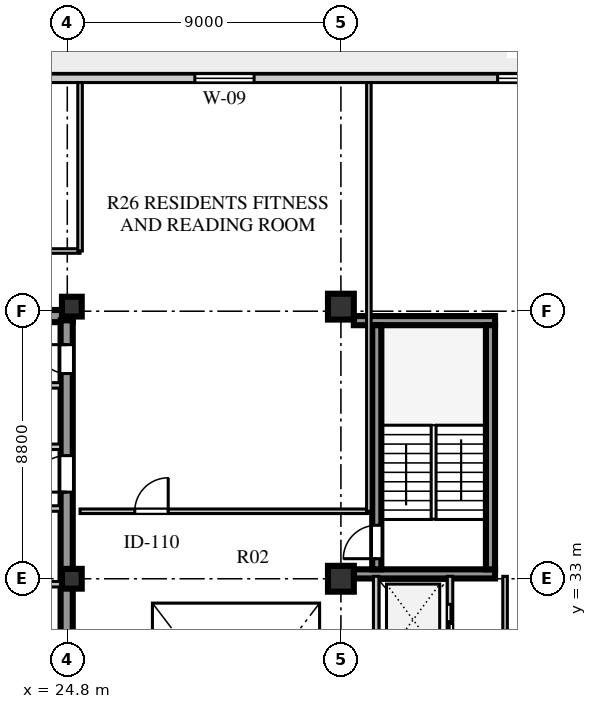
"""IFC4 building model, lengths in metres.
Left out: names, types, materials, properties, quantities, classifications, styles, units other than length and angle.
Written with IfcOpenShell. Run it as: python <this file> out.ifc"""

import sys

from ifc_helpers import new_model, si_unit, direction, frame, frame_2d, origin, origin_2d, place, context, subcontext, project, spatial, rectangle, extrude, element, fill, save


model = new_model("IFC4")
c1 = context("Model", 3, precision=1e-05, world=origin(), true_north=direction((0.0, 1.0)))
c2 = subcontext(c1, "Body", "Model", "MODEL_VIEW")
j1 = project(units=[si_unit("LENGTHUNIT", "METRE"), si_unit("PLANEANGLEUNIT", "RADIAN")], contexts=[c1])
p1 = place(None, origin())
s1 = spatial("IfcSite", under=j1, at=p1, CompositionType="ELEMENT")
p2 = place(p1, origin())
s2 = spatial("IfcBuilding", under=s1, at=p2, CompositionType="ELEMENT")
p3 = place(p2, frame((0.0, 0.0, 245.3)))
s3 = spatial("IfcBuildingStorey", under=s2, at=p3, CompositionType="ELEMENT", Elevation=245.3)
p4 = place(p3, frame((15.5, 41.64, 0.0), z_axis=(0.0, 0.0, 1.0), x_axis=(1.0, 0.0, 0.0)))
e1 = element("IfcWall", 1, at=p4, inside=s3, PredefinedType="SHEAR", context=c2, shape_type="SweptSolid", body=[
    extrude(rectangle(XDim=9.48, YDim=0.4, at=frame_2d((4.74, 0.0))), origin(), (0.0, 0.0, 1.0), 3.66),
])
p5 = place(p3, frame((24.78, 15.74, 0.0), z_axis=(0.0, 0.0, 1.0), x_axis=(0.0, 1.0, 0.0)))
e2 = element("IfcWall", 2, at=p5, inside=s3, PredefinedType="SHEAR", context=c2, shape_type="SweptSolid", body=[
    extrude(rectangle(XDim=25.76, YDim=0.4, at=frame_2d((12.88, 0.0))), origin(), (0.0, 0.0, 1.0), 3.66),
])
p6 = place(p5, frame((1.61, 0.0, 0.0)))
e3 = element("IfcOpeningElement", 3, at=p6, cuts=e2, PredefinedType="OPENING", context=c2, shape_type="SweptSolid", body=[
    extrude(rectangle(XDim=1.2, YDim=2.1, at=frame_2d((0.6, 1.05))), frame((0.0, 0.21, 0.0), z_axis=(0.0, -1.0, 0.0), x_axis=(1.0, 0.0, 0.0)), (0.0, 0.0, 1.0), 0.42),
])
p7 = place(p5, frame((6.78, 0.0, 0.0)))
e4 = element("IfcOpeningElement", 4, at=p7, cuts=e2, PredefinedType="OPENING", context=c2, shape_type="SweptSolid", body=[
    extrude(rectangle(XDim=0.85, YDim=2.06, at=frame_2d((0.425, 1.03))), frame((0.0, 0.21, 0.0), z_axis=(0.0, -1.0, 0.0), x_axis=(1.0, 0.0, 0.0)), (0.0, 0.0, 1.0), 0.42),
])
p8 = place(p5, frame((12.11, 0.0, 0.0)))
e5 = element("IfcOpeningElement", 5, at=p8, cuts=e2, PredefinedType="OPENING", context=c2, shape_type="SweptSolid", body=[
    extrude(rectangle(XDim=1.5, YDim=2.12, at=frame_2d((0.75, 1.06))), frame((0.0, 0.21, 0.0), z_axis=(0.0, -1.0, 0.0), x_axis=(1.0, 0.0, 0.0)), (0.0, 0.0, 1.0), 0.42),
])
p9 = place(p5, frame((20.11, 0.0, 0.0)))
e6 = element("IfcOpeningElement", 6, at=p9, cuts=e2, PredefinedType="OPENING", context=c2, shape_type="SweptSolid", body=[
    extrude(rectangle(XDim=1.2, YDim=2.12, at=frame_2d((0.6, 1.06))), frame((0.0, 0.21, 0.0), z_axis=(0.0, -1.0, 0.0), x_axis=(1.0, 0.0, 0.0)), (0.0, 0.0, 1.0), 0.42),
])
p10 = place(p5, frame((24.01, 0.0, 0.0)))
e7 = element("IfcOpeningElement", 7, at=p10, cuts=e2, PredefinedType="OPENING", context=c2, shape_type="SweptSolid", body=[
    extrude(rectangle(XDim=0.95, YDim=2.1, at=frame_2d((0.475, 1.05))), frame((0.0, 0.21, 0.0), z_axis=(0.0, -1.0, 0.0), x_axis=(1.0, 0.0, 0.0)), (0.0, 0.0, 1.0), 0.42),
])
for number, where, z_axis, x_axis in (
    (8, (34.225, 33.16, 0.0), (0.0, 0.0, 1.0), (1.0, 0.0, 0.0)),
    (9, (34.225, 41.49, 0.0), (0.0, 0.0, 1.0), (1.0, 0.0, 0.0)),
):
    element("IfcWall", number, at=place(p3, frame(where, z_axis=z_axis, x_axis=x_axis)), inside=s3, PredefinedType="SHEAR", context=c2, shape_type="SweptSolid", body=[
        extrude(rectangle(XDim=4.645, YDim=0.3, at=frame_2d((2.323, 0.0))), origin(), (0.0, 0.0, 1.0), 3.66),
    ])
p11 = place(p3, frame((34.98, 33.31, 0.0), z_axis=(0.0, 0.0, 1.0), x_axis=(0.0, 1.0, 0.0)))
e10 = element("IfcWall", 10, at=p11, inside=s3, PredefinedType="SHEAR", context=c2, shape_type="SweptSolid", body=[
    extrude(rectangle(XDim=8.03, YDim=0.3, at=frame_2d((4.015, 0.0))), origin(), (0.0, 0.0, 1.0), 3.66),
])
p12 = place(p11, frame((0.35, 0.0, 0.0)))
e11 = element("IfcOpeningElement", 11, at=p12, cuts=e10, PredefinedType="OPENING", context=c2, shape_type="SweptSolid", body=[
    extrude(rectangle(XDim=1.1, YDim=2.1, at=frame_2d((0.55, 1.05))), frame((0.0, 0.16, 0.0), z_axis=(0.0, -1.0, 0.0), x_axis=(1.0, 0.0, 0.0)), (0.0, 0.0, 1.0), 0.32),
])
p13 = place(p3, frame((38.72, 33.31, 0.0), z_axis=(0.0, 0.0, 1.0), x_axis=(0.0, 1.0, 0.0)))
e12 = element("IfcWall", 12, at=p13, inside=s3, PredefinedType="SHEAR", context=c2, shape_type="SweptSolid", body=[
    extrude(rectangle(XDim=8.03, YDim=0.3, at=frame_2d((4.015, 0.0))), origin(), (0.0, 0.0, 1.0), 3.66),
])
for number, where, z_axis, x_axis in (
    (13, (24.95, 33.0, 0.0), (0.0, 0.0, 1.0), (1.0, 0.0, 0.0)),
    (14, (24.95, 41.95, 0.0), (0.0, 0.0, 1.0), (1.0, 0.0, 0.0)),
):
    element("IfcColumn", number, at=place(p3, frame(where, z_axis=z_axis, x_axis=x_axis)), inside=s3, PredefinedType="COLUMN", context=c2, shape_type="SweptSolid", body=[
        extrude(rectangle(XDim=0.65, YDim=0.65, at=origin_2d()), origin(), (0.0, 0.0, 1.0), 3.66),
    ])
for number, where, z_axis, x_axis in (
    (15, (33.8, 33.0, 0.0), (0.0, 0.0, 1.0), (1.0, 0.0, 0.0)),
    (16, (33.8, 41.95, 0.0), (0.0, 0.0, 1.0), (1.0, 0.0, 0.0)),
):
    element("IfcColumn", number, at=place(p3, frame(where, z_axis=z_axis, x_axis=x_axis)), inside=s3, PredefinedType="COLUMN", context=c2, shape_type="SweptSolid", body=[
        extrude(rectangle(XDim=0.85, YDim=0.85, at=origin_2d()), origin(), (0.0, 0.0, 1.0), 3.66),
    ])
p14 = place(p3, frame((45.55, 49.46, 0.0), z_axis=(0.0, 0.0, 1.0), x_axis=(-1.0, 0.0, 0.0)))
e17 = element("IfcWall", 17, at=p14, inside=s3, PredefinedType="STANDARD", context=c2, shape_type="SweptSolid", body=[
    extrude(rectangle(XDim=32.5, YDim=0.28, at=frame_2d((16.25, 0.0))), origin(), (0.0, 0.0, 1.0), 3.66),
])
p15 = place(p14, frame((30.55, 0.0, 0.0)))
e18 = element("IfcOpeningElement", 18, at=p15, cuts=e17, PredefinedType="OPENING", context=c2, shape_type="SweptSolid", body=[
    extrude(rectangle(XDim=1.0, YDim=2.05, at=frame_2d((0.5, 1.025))), frame((0.0, 0.15, 0.0), z_axis=(0.0, -1.0, 0.0), x_axis=(1.0, 0.0, 0.0)), (0.0, 0.0, 1.0), 0.3),
])
p16 = place(p14, frame((24.64, 0.0, 0.8)))
e19 = element("IfcOpeningElement", 19, at=p16, cuts=e17, PredefinedType="OPENING", context=c2, shape_type="SweptSolid", body=[
    extrude(rectangle(XDim=1.65, YDim=1.95, at=frame_2d((0.825, 0.975))), frame((0.0, 0.15, 0.0), z_axis=(0.0, -1.0, 0.0), x_axis=(1.0, 0.0, 0.0)), (0.0, 0.0, 1.0), 0.3),
])
p17 = place(p14, frame((14.605, 0.0, 0.8)))
e20 = element("IfcOpeningElement", 20, at=p17, cuts=e17, PredefinedType="OPENING", context=c2, shape_type="SweptSolid", body=[
    extrude(rectangle(XDim=1.95, YDim=2.0, at=frame_2d((0.975, 1.0))), frame((0.0, 0.15, 0.0), z_axis=(0.0, -1.0, 0.0), x_axis=(1.0, 0.0, 0.0)), (0.0, 0.0, 1.0), 0.3),
])
p18 = place(p14, frame((4.345, 0.0, 0.8)))
e21 = element("IfcOpeningElement", 21, at=p18, cuts=e17, PredefinedType="OPENING", context=c2, shape_type="SweptSolid", body=[
    extrude(rectangle(XDim=2.25, YDim=2.0, at=frame_2d((1.125, 1.0))), frame((0.0, 0.15, 0.0), z_axis=(0.0, -1.0, 0.0), x_axis=(1.0, 0.0, 0.0)), (0.0, 0.0, 1.0), 0.3),
])
p19 = place(p3, frame((15.9, 32.82, 0.0), z_axis=(0.0, 0.0, 1.0), x_axis=(1.0, 0.0, 0.0)))
e22 = element("IfcWall", 22, at=p19, inside=s3, PredefinedType="SOLIDWALL", context=c2, shape_type="SweptSolid", body=[
    extrude(rectangle(XDim=8.68, YDim=0.18, at=frame_2d((4.34, 0.0))), origin(), (0.0, 0.0, 1.0), 3.06),
])
p20 = place(p3, frame((22.02, 35.31, 0.0), z_axis=(0.0, 0.0, 1.0), x_axis=(1.0, 0.0, 0.0)))
e23 = element("IfcWall", 23, at=p20, inside=s3, PredefinedType="SOLIDWALL", context=c2, shape_type="SweptSolid", body=[
    extrude(rectangle(XDim=2.56, YDim=0.18, at=frame_2d((1.28, 0.0))), origin(), (0.0, 0.0, 1.0), 3.66),
])
p21 = place(p20, frame((0.55, 0.0, 0.0)))
e24 = element("IfcOpeningElement", 24, at=p21, cuts=e23, PredefinedType="OPENING", context=c2, shape_type="SweptSolid", body=[
    extrude(rectangle(XDim=1.0, YDim=2.1, at=frame_2d((0.5, 1.05))), frame((0.0, 0.1, 0.0), z_axis=(0.0, -1.0, 0.0), x_axis=(1.0, 0.0, 0.0)), (0.0, 0.0, 1.0), 0.2),
])
p22 = place(p3, frame((19.64, 37.34, 0.0), z_axis=(0.0, 0.0, 1.0), x_axis=(1.0, 0.0, 0.0)))
e25 = element("IfcWall", 25, at=p22, inside=s3, PredefinedType="SOLIDWALL", context=c2, shape_type="SweptSolid", body=[
    extrude(rectangle(XDim=4.94, YDim=0.18, at=frame_2d((2.47, 0.0))), origin(), (0.0, 0.0, 1.0), 3.66),
])
p23 = place(p22, frame((0.45, 0.0, 0.0)))
e26 = element("IfcOpeningElement", 26, at=p23, cuts=e25, PredefinedType="OPENING", context=c2, shape_type="SweptSolid", body=[
    extrude(rectangle(XDim=1.0, YDim=2.1, at=frame_2d((0.5, 1.05))), frame((0.0, 0.1, 0.0), z_axis=(0.0, -1.0, 0.0), x_axis=(1.0, 0.0, 0.0)), (0.0, 0.0, 1.0), 0.2),
])
p24 = place(p22, frame((2.5, 0.0, 0.0)))
e27 = element("IfcOpeningElement", 27, at=p24, cuts=e25, PredefinedType="OPENING", context=c2, shape_type="SweptSolid", body=[
    extrude(rectangle(XDim=1.0, YDim=2.1, at=frame_2d((0.5, 1.05))), frame((0.0, 0.1, 0.0), z_axis=(0.0, -1.0, 0.0), x_axis=(1.0, 0.0, 0.0)), (0.0, 0.0, 1.0), 0.2),
])
p25 = place(p3, frame((19.64, 39.36, 0.0), z_axis=(0.0, 0.0, 1.0), x_axis=(1.0, 0.0, 0.0)))
e28 = element("IfcWall", 28, at=p25, inside=s3, PredefinedType="SOLIDWALL", context=c2, shape_type="SweptSolid", body=[
    extrude(rectangle(XDim=4.94, YDim=0.18, at=frame_2d((2.47, 0.0))), origin(), (0.0, 0.0, 1.0), 3.66),
])
p26 = place(p3, frame((34.96, 28.86, 0.0), z_axis=(0.0, 0.0, 1.0), x_axis=(0.0, 1.0, 0.0)))
e29 = element("IfcWall", 29, at=p26, inside=s3, PredefinedType="SOLIDWALL", context=c2, shape_type="SweptSolid", body=[
    extrude(rectangle(XDim=4.22, YDim=0.18, at=frame_2d((2.11, 0.0))), origin(), (0.0, 0.0, 1.0), 3.66),
])
p27 = place(p3, frame((37.39, 28.86, 0.0), z_axis=(0.0, 0.0, 1.0), x_axis=(0.0, 1.0, 0.0)))
e30 = element("IfcWall", 30, at=p27, inside=s3, PredefinedType="SOLIDWALL", context=c2, shape_type="SweptSolid", body=[
    extrude(rectangle(XDim=4.22, YDim=0.18, at=frame_2d((2.11, 0.0))), origin(), (0.0, 0.0, 1.0), 3.66),
])
p28 = place(p27, frame((2.1, 0.0, 0.0)))
e31 = element("IfcOpeningElement", 31, at=p28, cuts=e30, PredefinedType="OPENING", context=c2, shape_type="SweptSolid", body=[
    extrude(rectangle(XDim=1.2, YDim=2.12, at=frame_2d((0.6, 1.06))), frame((0.0, 0.1, 0.0), z_axis=(0.0, -1.0, 0.0), x_axis=(1.0, 0.0, 0.0)), (0.0, 0.0, 1.0), 0.2),
])
p29 = place(p3, frame((39.2, 28.86, 0.0), z_axis=(0.0, 0.0, 1.0), x_axis=(0.0, 1.0, 0.0)))
e32 = element("IfcWall", 32, at=p29, inside=s3, PredefinedType="PARTITIONING", context=c2, shape_type="SweptSolid", body=[
    extrude(rectangle(XDim=4.22, YDim=0.15, at=frame_2d((2.11, 0.0))), origin(), (0.0, 0.0, 1.0), 3.66),
])
p30 = place(p3, frame((25.22, 35.22, 0.0), z_axis=(0.0, 0.0, 1.0), x_axis=(1.0, 0.0, 0.0)))
e33 = element("IfcWall", 33, at=p30, inside=s3, PredefinedType="PARTITIONING", context=c2, shape_type="SweptSolid", body=[
    extrude(rectangle(XDim=9.5, YDim=0.15, at=frame_2d((4.75, 0.0))), origin(), (0.0, 0.0, 1.0), 3.66),
])
p31 = place(p30, frame((1.8, 0.0, 0.0)))
e34 = element("IfcOpeningElement", 34, at=p31, cuts=e33, PredefinedType="OPENING", context=c2, shape_type="SweptSolid", body=[
    extrude(rectangle(XDim=1.1, YDim=2.08, at=frame_2d((0.55, 1.04))), frame((0.0, 0.085, 0.0), z_axis=(0.0, -1.0, 0.0), x_axis=(1.0, 0.0, 0.0)), (0.0, 0.0, 1.0), 0.17),
])
p32 = place(p3, frame((13.4, 43.78, 0.0), z_axis=(0.0, 0.0, 1.0), x_axis=(1.0, 0.0, 0.0)))
e35 = element("IfcWall", 35, at=p32, inside=s3, PredefinedType="PARTITIONING", context=c2, shape_type="SweptSolid", body=[
    extrude(rectangle(XDim=11.82, YDim=0.15, at=frame_2d((5.91, 0.0))), origin(), (0.0, 0.0, 1.0), 3.66),
])
p33 = place(p32, frame((3.2, 0.0, 0.0)))
e36 = element("IfcOpeningElement", 36, at=p33, cuts=e35, PredefinedType="OPENING", context=c2, shape_type="SweptSolid", body=[
    extrude(rectangle(XDim=0.95, YDim=2.08, at=frame_2d((0.475, 1.04))), frame((0.0, 0.085, 0.0), z_axis=(0.0, -1.0, 0.0), x_axis=(1.0, 0.0, 0.0)), (0.0, 0.0, 1.0), 0.17),
])
p34 = place(p3, frame((25.22, 43.78, 0.0), z_axis=(0.0, 0.0, 1.0), x_axis=(0.0, 1.0, 0.0)))
e37 = element("IfcWall", 37, at=p34, inside=s3, PredefinedType="PARTITIONING", context=c2, shape_type="SweptSolid", body=[
    extrude(rectangle(XDim=5.54, YDim=0.15, at=frame_2d((2.77, 0.0))), origin(), (0.0, 0.0, 1.0), 3.21),
])
p35 = place(p3, frame((34.72, 35.22, 0.0), z_axis=(0.0, 0.0, 1.0), x_axis=(0.0, 1.0, 0.0)))
e38 = element("IfcWall", 38, at=p35, inside=s3, PredefinedType="PARTITIONING", context=c2, shape_type="SweptSolid", body=[
    extrude(rectangle(XDim=14.1, YDim=0.15, at=frame_2d((7.05, 0.0))), origin(), (0.0, 0.0, 1.0), 3.66),
])
p36 = place(p17, origin())
e39 = element("IfcWindow", 39, at=p36, inside=s3, PartitioningType="SINGLE_PANEL", PredefinedType="WINDOW", context=c2, shape_type="SweptSolid", body=[
    extrude(rectangle(XDim=1.95, YDim=2.0, at=frame_2d((0.975, 1.0))), frame((0.0, 0.03, 0.0), z_axis=(0.0, -1.0, 0.0), x_axis=(1.0, 0.0, 0.0)), (0.0, 0.0, 1.0), 0.06),
])
fill(e20, e39)
p37 = place(p18, origin())
e40 = element("IfcWindow", 40, at=p37, inside=s3, PartitioningType="SINGLE_PANEL", PredefinedType="WINDOW", context=c2, shape_type="SweptSolid", body=[
    extrude(rectangle(XDim=2.25, YDim=2.0, at=frame_2d((1.125, 1.0))), frame((0.0, 0.03, 0.0), z_axis=(0.0, -1.0, 0.0), x_axis=(1.0, 0.0, 0.0)), (0.0, 0.0, 1.0), 0.06),
])
fill(e21, e40)
p38 = place(p9, frame((1.2, 0.0, 0.0), z_axis=(0.0, 0.0, 1.0), x_axis=(-1.0, 0.0, 0.0)))
e41 = element("IfcDoor", 41, at=p38, inside=s3, OperationType="SINGLE_SWING_RIGHT", PredefinedType="DOOR", context=c2, shape_type="SweptSolid", body=[
    extrude(rectangle(XDim=1.2, YDim=2.12, at=frame_2d((0.6, 1.06))), frame((0.0, 0.025, 0.0), z_axis=(0.0, -1.0, 0.0), x_axis=(1.0, 0.0, 0.0)), (0.0, 0.0, 1.0), 0.05),
])
fill(e6, e41)
p39 = place(p10, frame((0.95, 0.0, 0.0), z_axis=(0.0, 0.0, 1.0), x_axis=(-1.0, 0.0, 0.0)))
e42 = element("IfcDoor", 42, at=p39, inside=s3, OperationType="SINGLE_SWING_LEFT", PredefinedType="DOOR", context=c2, shape_type="SweptSolid", body=[
    extrude(rectangle(XDim=0.95, YDim=2.1, at=frame_2d((0.475, 1.05))), frame((0.0, 0.025, 0.0), z_axis=(0.0, -1.0, 0.0), x_axis=(1.0, 0.0, 0.0)), (0.0, 0.0, 1.0), 0.05),
])
fill(e7, e42)
p40 = place(p12, origin())
e43 = element("IfcDoor", 43, at=p40, inside=s3, OperationType="SINGLE_SWING_LEFT", PredefinedType="DOOR", context=c2, shape_type="SweptSolid", body=[
    extrude(rectangle(XDim=1.1, YDim=2.1, at=frame_2d((0.55, 1.05))), frame((0.0, 0.025, 0.0), z_axis=(0.0, -1.0, 0.0), x_axis=(1.0, 0.0, 0.0)), (0.0, 0.0, 1.0), 0.05),
])
fill(e11, e43)
p41 = place(p28, frame((1.2, 0.0, 0.0), z_axis=(0.0, 0.0, 1.0), x_axis=(-1.0, 0.0, 0.0)))
e44 = element("IfcDoor", 44, at=p41, inside=s3, OperationType="DOUBLE_DOOR_SLIDING", PredefinedType="DOOR", context=c2, shape_type="SweptSolid", body=[
    extrude(rectangle(XDim=1.2, YDim=2.12, at=frame_2d((0.6, 1.06))), frame((0.0, 0.025, 0.0), z_axis=(0.0, -1.0, 0.0), x_axis=(1.0, 0.0, 0.0)), (0.0, 0.0, 1.0), 0.05),
])
fill(e31, e44)
p42 = place(p31, origin())
e45 = element("IfcDoor", 45, at=p42, inside=s3, OperationType="SINGLE_SWING_RIGHT", PredefinedType="DOOR", context=c2, shape_type="SweptSolid", body=[
    extrude(rectangle(XDim=1.1, YDim=2.08, at=frame_2d((0.55, 1.04))), frame((0.0, 0.025, 0.0), z_axis=(0.0, -1.0, 0.0), x_axis=(1.0, 0.0, 0.0)), (0.0, 0.0, 1.0), 0.05),
])
fill(e34, e45)
save(model, sys.argv[1])
